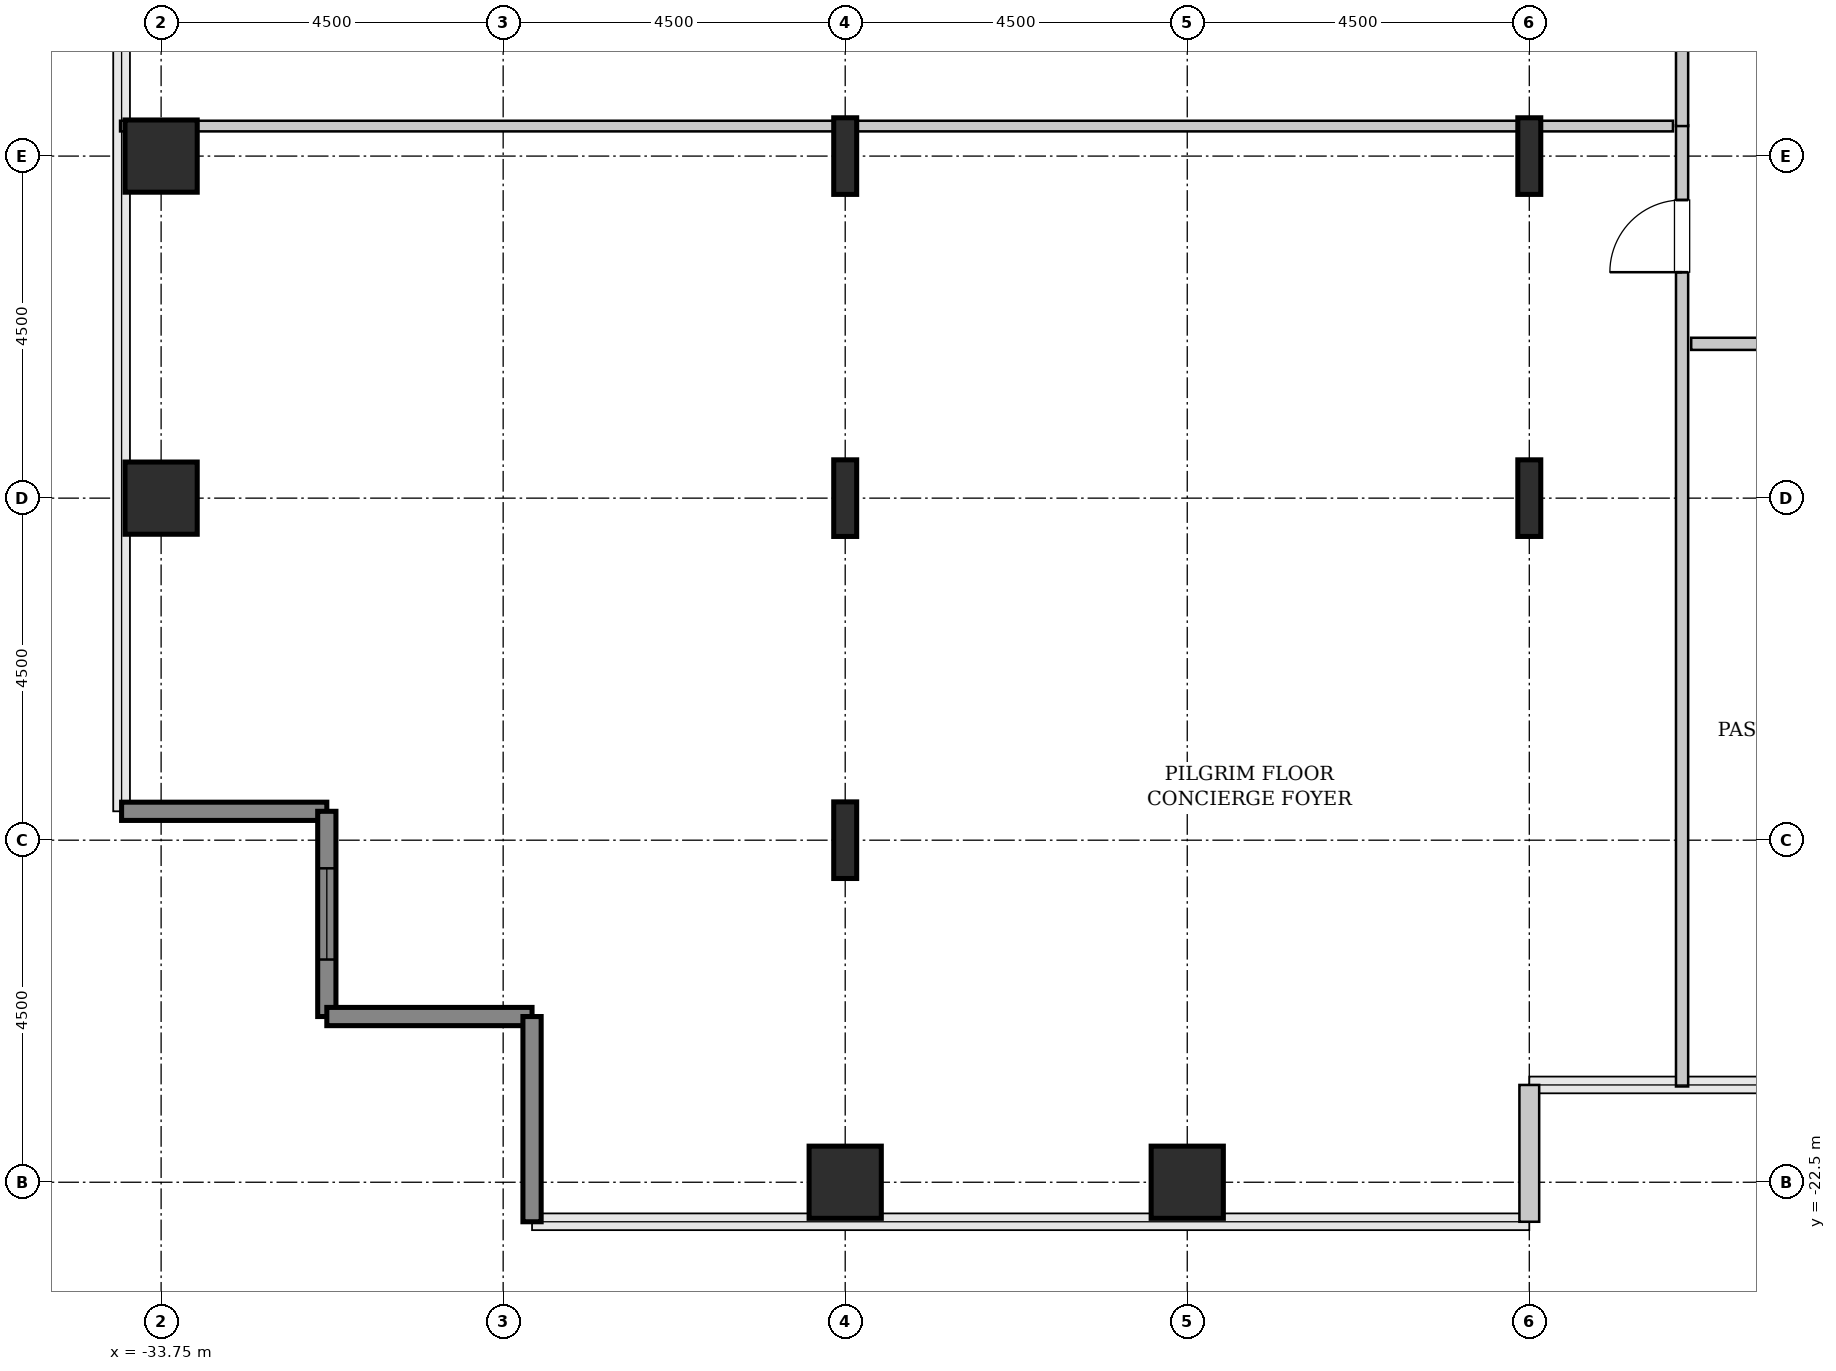
"""IFC4 building model, lengths in metres.
Left out: names, types, materials, properties, quantities, classifications, styles, units other than length and angle.
Written with IfcOpenShell. Run it as: python <this file> out.ifc"""

import sys

from ifc_helpers import new_model, si_unit, direction, frame, frame_2d, origin, origin_2d, place, context, subcontext, project, spatial, rectangle, hollow_rectangle, i_section, extrude, source, transform, mapped, element, fill, save


model = new_model("IFC4")
c1 = context("Model", 3, precision=1e-05, world=origin(), true_north=direction((0.0, 1.0)))
c2 = subcontext(c1, "Body", "Model", "MODEL_VIEW")
j1 = project(units=[si_unit("LENGTHUNIT", "METRE"), si_unit("PLANEANGLEUNIT", "RADIAN")], contexts=[c1])
p1 = place(None, origin())
s1 = spatial("IfcSite", under=j1, at=p1, CompositionType="ELEMENT")
p2 = place(p1, origin())
s2 = spatial("IfcBuilding", under=s1, at=p2, CompositionType="ELEMENT")
p3 = place(p2, frame((0.0, 0.0, 74.8)))
s3 = spatial("IfcBuildingStorey", under=s2, at=p3, CompositionType="ELEMENT", Elevation=74.8)
m1 = source(origin(), c2, "Body", "SweptSolid", [
    extrude(hollow_rectangle(XDim=0.95, YDim=0.95, WallThickness=0.045, InnerFilletRadius=0.045, OuterFilletRadius=0.09, at=origin_2d()), origin(), (0.0, 0.0, 1.0), 3.8),
])
for number, where, z_axis, x_axis in (
    (1, (-33.75, -13.5, 0.0), (0.0, 0.0, 1.0), (1.0, 0.0, 0.0)),
    (2, (-33.75, -9.0, 0.0), (0.0, 0.0, 1.0), (1.0, 0.0, 0.0)),
    (3, (-24.75, -22.5, 0.0), (0.0, 0.0, 1.0), (1.0, 0.0, 0.0)),
):
    element("IfcColumn", number, at=place(p3, frame(where, z_axis=z_axis, x_axis=x_axis)), inside=s3, PredefinedType="COLUMN", context=c2, shape_type="MappedRepresentation", body=[
        mapped(m1, transform((0.0, 0.0, 0.0), x_axis=(1.0, 0.0, 0.0), y_axis=(0.0, 1.0, 0.0), z_axis=(0.0, 0.0, 1.0), scale=1.0)),
    ])
m2 = source(origin(), c2, "Body", "SweptSolid", [
    extrude(i_section(OverallWidth=0.302, OverallDepth=1.008, WebThickness=0.021, FlangeThickness=0.04, FilletRadius=0.03, at=origin_2d()), origin(), (0.0, 0.0, 1.0), 3.8),
])
for number, where, z_axis, x_axis in (
    (4, (-24.75, -18.0, 0.0), (0.0, 0.0, 1.0), (1.0, 0.0, 0.0)),
    (5, (-24.75, -13.5, 0.0), (0.0, 0.0, 1.0), (1.0, 0.0, 0.0)),
    (6, (-24.75, -9.0, 0.0), (0.0, 0.0, 1.0), (1.0, 0.0, 0.0)),
):
    element("IfcColumn", number, at=place(p3, frame(where, z_axis=z_axis, x_axis=x_axis)), inside=s3, PredefinedType="COLUMN", context=c2, shape_type="MappedRepresentation", body=[
        mapped(m2, transform((0.0, 0.0, 0.0), x_axis=(1.0, 0.0, 0.0), y_axis=(0.0, 1.0, 0.0), z_axis=(0.0, 0.0, 1.0), scale=1.0)),
    ])
p4 = place(p3, frame((-20.25, -22.5, 0.0), z_axis=(0.0, 0.0, 1.0), x_axis=(1.0, 0.0, 0.0)))
e7 = element("IfcColumn", 7, at=p4, inside=s3, PredefinedType="COLUMN", context=c2, shape_type="MappedRepresentation", body=[
    mapped(m1, transform((0.0, 0.0, 0.0), x_axis=(1.0, 0.0, 0.0), y_axis=(0.0, 1.0, 0.0), z_axis=(0.0, 0.0, 1.0), scale=1.0)),
])
for number, where, z_axis, x_axis in (
    (8, (-15.75, -13.5, 0.0), (0.0, 0.0, 1.0), (1.0, 0.0, 0.0)),
    (9, (-15.75, -9.0, 0.0), (0.0, 0.0, 1.0), (1.0, 0.0, 0.0)),
):
    element("IfcColumn", number, at=place(p3, frame(where, z_axis=z_axis, x_axis=x_axis)), inside=s3, PredefinedType="COLUMN", context=c2, shape_type="MappedRepresentation", body=[
        mapped(m2, transform((0.0, 0.0, 0.0), x_axis=(1.0, 0.0, 0.0), y_axis=(0.0, 1.0, 0.0), z_axis=(0.0, 0.0, 1.0), scale=1.0)),
    ])
m3 = source(origin(), c2, "Body", "SweptSolid", [
    extrude(rectangle(XDim=2.7, YDim=0.24, at=frame_2d((1.35, 0.0))), origin(), (0.0, 0.0, 1.0), 3.55),
])
p5 = place(p3, frame((-34.27, -17.62, 0.0), z_axis=(0.0, 0.0, 1.0), x_axis=(1.0, 0.0, 0.0)))
e10 = element("IfcWall", 10, at=p5, inside=s3, PredefinedType="SHEAR", context=c2, shape_type="MappedRepresentation", body=[
    mapped(m3, transform((0.0, 0.0, 0.0), x_axis=(1.0, 0.0, 0.0), y_axis=(0.0, 1.0, 0.0), z_axis=(0.0, 0.0, 1.0), scale=1.0)),
])
p6 = place(p3, frame((-31.57, -17.62, 0.0), z_axis=(0.0, 0.0, 1.0), x_axis=(0.0, -1.0, 0.0)))
e11 = element("IfcWall", 11, at=p6, inside=s3, PredefinedType="SHEAR", context=c2, shape_type="MappedRepresentation", body=[
    mapped(m3, transform((0.0, 0.0, 0.0), x_axis=(1.0, 0.0, 0.0), y_axis=(0.0, 1.0, 0.0), z_axis=(0.0, 0.0, 1.0), scale=1.0)),
])
p7 = place(p6, frame((0.75, 0.0, 0.85)))
e12 = element("IfcOpeningElement", 12, at=p7, cuts=e11, PredefinedType="OPENING", context=c2, shape_type="SweptSolid", body=[
    extrude(rectangle(XDim=1.2, YDim=1.8, at=frame_2d((0.6, 0.9))), frame((0.0, 0.13, 0.0), z_axis=(0.0, -1.0, 0.0), x_axis=(1.0, 0.0, 0.0)), (0.0, 0.0, 1.0), 0.26),
])
for number, where, z_axis, x_axis in (
    (13, (-31.57, -20.32, 0.0), (0.0, 0.0, 1.0), (1.0, 0.0, 0.0)),
    (14, (-28.87, -20.32, 0.0), (0.0, 0.0, 1.0), (0.0, -1.0, 0.0)),
):
    element("IfcWall", number, at=place(p3, frame(where, z_axis=z_axis, x_axis=x_axis)), inside=s3, PredefinedType="SHEAR", context=c2, shape_type="MappedRepresentation", body=[
        mapped(m3, transform((0.0, 0.0, 0.0), x_axis=(1.0, 0.0, 0.0), y_axis=(0.0, 1.0, 0.0), z_axis=(0.0, 0.0, 1.0), scale=1.0)),
    ])
m4 = source(origin(), c2, "Body", "SweptSolid", [
    extrude(rectangle(XDim=1.8, YDim=0.26, at=frame_2d((0.9, 0.0))), origin(), (0.0, 0.0, 1.0), 3.55),
])
p8 = place(p3, frame((-15.75, -23.02, 0.0), z_axis=(0.0, 0.0, 1.0), x_axis=(0.0, 1.0, 0.0)))
e15 = element("IfcWall", 15, at=p8, inside=s3, PredefinedType="SOLIDWALL", context=c2, shape_type="MappedRepresentation", body=[
    mapped(m4, transform((0.0, 0.0, 0.0), x_axis=(1.0, 0.0, 0.0), y_axis=(0.0, 1.0, 0.0), z_axis=(0.0, 0.0, 1.0), scale=1.0)),
])
m5 = source(origin(), c2, "Body", "SweptSolid", [
    extrude(rectangle(XDim=12.645, YDim=0.16, at=frame_2d((6.323, 0.0))), origin(), (0.0, 0.0, 1.0), 3.535),
])
p9 = place(p3, frame((-13.74, -21.24, 0.0), z_axis=(0.0, 0.0, 1.0), x_axis=(0.0, 1.0, 0.0)))
e16 = element("IfcWall", 16, at=p9, inside=s3, PredefinedType="PARTITIONING", context=c2, shape_type="MappedRepresentation", body=[
    mapped(m5, transform((0.0, 0.0, 0.0), x_axis=(1.0, 0.0, 0.0), y_axis=(0.0, 1.0, 0.0), z_axis=(0.0, 0.0, 1.0), scale=1.0)),
])
p10 = place(p9, frame((10.712, 0.0, 0.0)))
e17 = element("IfcOpeningElement", 17, at=p10, cuts=e16, PredefinedType="OPENING", context=c2, shape_type="SweptSolid", body=[
    extrude(rectangle(XDim=0.95, YDim=2.1, at=frame_2d((0.475, 1.05))), frame((0.0, 0.09, 0.0), z_axis=(0.0, -1.0, 0.0), x_axis=(1.0, 0.0, 0.0)), (0.0, 0.0, 1.0), 0.18),
])
m6 = source(origin(), c2, "Body", "SweptSolid", [
    extrude(rectangle(XDim=20.43, YDim=0.14, at=frame_2d((10.215, 0.0))), origin(), (0.0, 0.0, 1.0), 2.825),
])
p11 = place(p3, frame((-34.29, -8.605, 0.0), z_axis=(0.0, 0.0, 1.0), x_axis=(1.0, 0.0, 0.0)))
e18 = element("IfcWall", 18, at=p11, inside=s3, PredefinedType="PARTITIONING", context=c2, shape_type="MappedRepresentation", body=[
    mapped(m6, transform((0.0, 0.0, 0.0), x_axis=(1.0, 0.0, 0.0), y_axis=(0.0, 1.0, 0.0), z_axis=(0.0, 0.0, 1.0), scale=1.0)),
])
m7 = source(origin(), c2, "Body", "SweptSolid", [
    extrude(rectangle(XDim=3.21, YDim=0.16, at=frame_2d((1.605, 0.0))), origin(), (0.0, 0.0, 1.0), 3.535),
])
p12 = place(p3, frame((-13.74, -8.605, 0.0), z_axis=(0.0, 0.0, 1.0), x_axis=(0.0, 1.0, 0.0)))
e19 = element("IfcWall", 19, at=p12, inside=s3, PredefinedType="PARTITIONING", context=c2, shape_type="MappedRepresentation", body=[
    mapped(m7, transform((0.0, 0.0, 0.0), x_axis=(1.0, 0.0, 0.0), y_axis=(0.0, 1.0, 0.0), z_axis=(0.0, 0.0, 1.0), scale=1.0)),
])
p13 = place(p12, frame((1.13, 0.0, 0.0)))
e20 = element("IfcOpeningElement", 20, at=p13, cuts=e19, PredefinedType="OPENING", context=c2, shape_type="SweptSolid", body=[
    extrude(rectangle(XDim=0.95, YDim=2.1, at=frame_2d((0.475, 1.05))), frame((0.0, 0.09, 0.0), z_axis=(0.0, -1.0, 0.0), x_axis=(1.0, 0.0, 0.0)), (0.0, 0.0, 1.0), 0.18),
])
m8 = source(origin(), c2, "Body", "SweptSolid", [
    extrude(rectangle(XDim=7.225, YDim=0.16, at=frame_2d((3.613, 0.0))), origin(), (0.0, 0.0, 1.0), 3.535),
])
p14 = place(p3, frame((-13.62, -11.47, 0.0), z_axis=(0.0, 0.0, 1.0), x_axis=(1.0, 0.0, 0.0)))
e21 = element("IfcWall", 21, at=p14, inside=s3, PredefinedType="PARTITIONING", context=c2, shape_type="MappedRepresentation", body=[
    mapped(m8, transform((0.0, 0.0, 0.0), x_axis=(1.0, 0.0, 0.0), y_axis=(0.0, 1.0, 0.0), z_axis=(0.0, 0.0, 1.0), scale=1.0)),
])
p15 = place(p14, frame((3.137, 0.0, 0.0)))
e22 = element("IfcOpeningElement", 22, at=p15, cuts=e21, PredefinedType="OPENING", context=c2, shape_type="SweptSolid", body=[
    extrude(rectangle(XDim=0.95, YDim=2.1, at=frame_2d((0.475, 1.05))), frame((0.0, 0.09, 0.0), z_axis=(0.0, -1.0, 0.0), x_axis=(1.0, 0.0, 0.0)), (0.0, 0.0, 1.0), 0.18),
])
m9 = source(origin(), c2, "Body", "SweptSolid", [
    extrude(rectangle(XDim=1.2, YDim=1.8, at=frame_2d((0.6, 0.9))), frame((0.0, 0.03, 0.0), z_axis=(0.0, -1.0, 0.0), x_axis=(1.0, 0.0, 0.0)), (0.0, 0.0, 1.0), 0.06),
])
p16 = place(p7, origin())
e23 = element("IfcWindow", 23, at=p16, inside=s3, PartitioningType="SINGLE_PANEL", PredefinedType="WINDOW", context=c2, shape_type="MappedRepresentation", body=[
    mapped(m9, transform((0.0, 0.0, 0.0), x_axis=(1.0, 0.0, 0.0), y_axis=(0.0, 1.0, 0.0), z_axis=(0.0, 0.0, 1.0), scale=1.0)),
])
fill(e12, e23)
m10 = source(origin(), c2, "Body", "SweptSolid", [
    extrude(rectangle(XDim=0.95, YDim=2.1, at=frame_2d((0.475, 1.05))), frame((0.0, 0.025, 0.0), z_axis=(0.0, -1.0, 0.0), x_axis=(1.0, 0.0, 0.0)), (0.0, 0.0, 1.0), 0.05),
])
p17 = place(p10, origin())
e24 = element("IfcDoor", 24, at=p17, inside=s3, OperationType="SINGLE_SWING_LEFT", PredefinedType="DOOR", context=c2, shape_type="MappedRepresentation", body=[
    mapped(m10, transform((0.0, 0.0, 0.0), x_axis=(1.0, 0.0, 0.0), y_axis=(0.0, 1.0, 0.0), z_axis=(0.0, 0.0, 1.0), scale=1.0)),
])
fill(e17, e24)
save(model, sys.argv[1])
